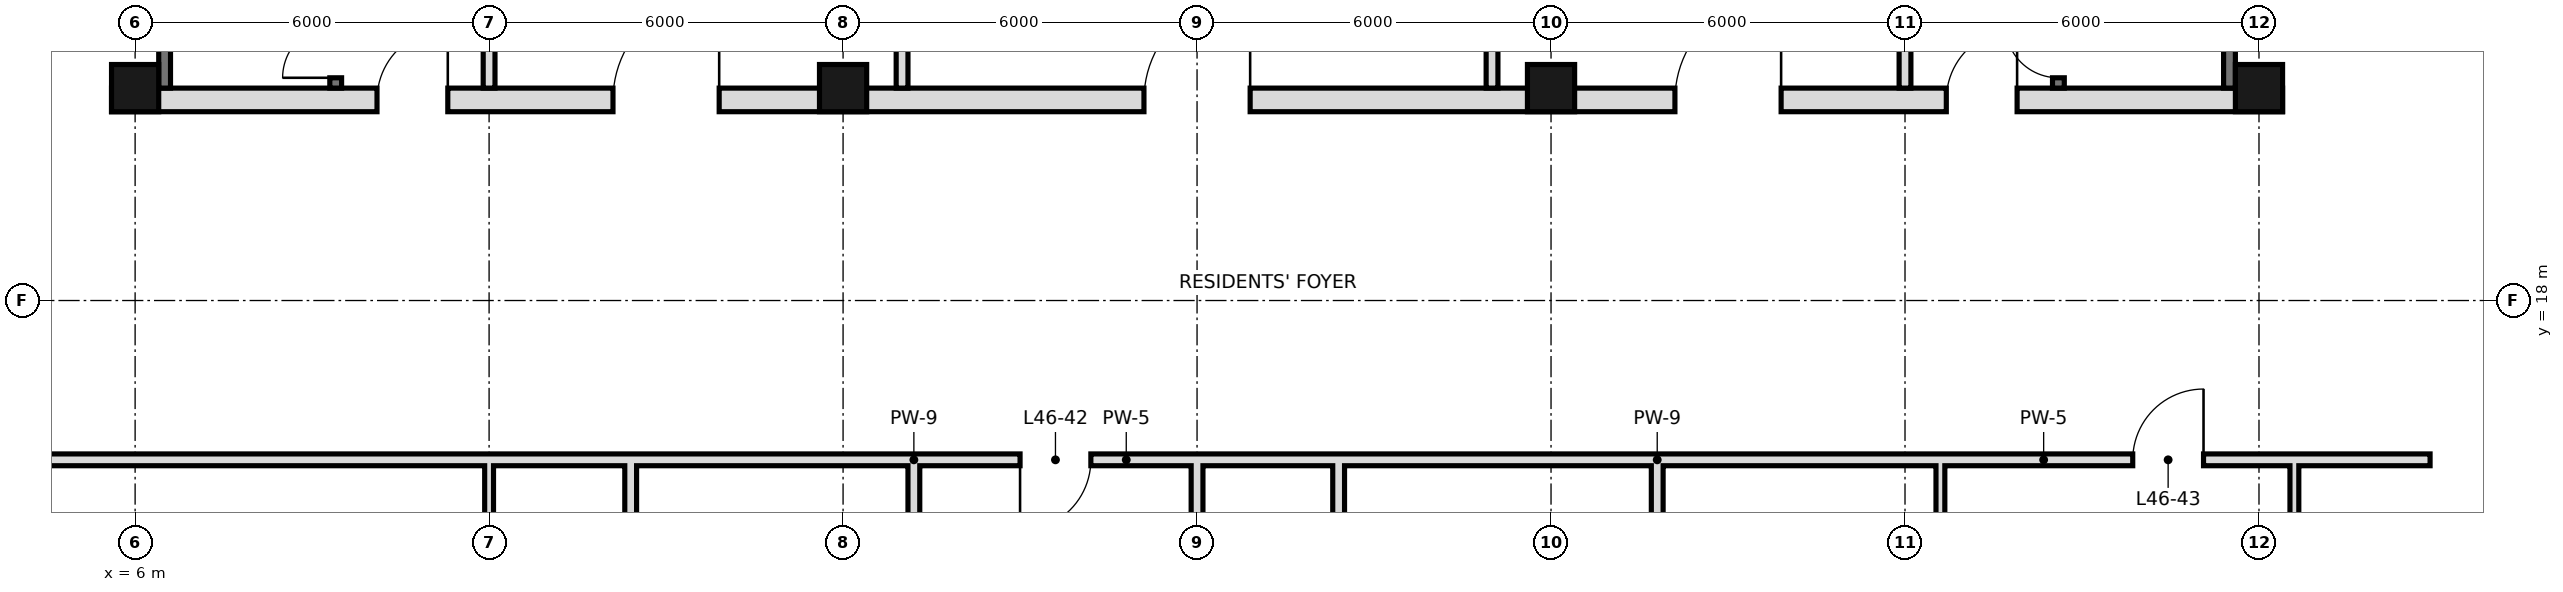
"""IFC4 building model, lengths in metres.
Left out: names, types, materials, properties, quantities, classifications, styles, units other than length and angle.
Written with IfcOpenShell. Run it as: python <this file> out.ifc"""

import sys

from ifc_helpers import new_model, si_unit, direction, frame, frame_2d, origin, origin_2d, place, context, subcontext, project, spatial, rectangle, hollow_rectangle, extrude, element, fill, save


model = new_model("IFC4")
c1 = context("Model", 3, precision=1e-05, world=origin(), true_north=direction((0.0, 1.0)))
c2 = subcontext(c1, "Body", "Model", "MODEL_VIEW")
j1 = project(units=[si_unit("LENGTHUNIT", "METRE"), si_unit("PLANEANGLEUNIT", "RADIAN")], contexts=[c1])
p1 = place(None, origin())
s1 = spatial("IfcSite", under=j1, at=p1, CompositionType="ELEMENT")
p2 = place(p1, origin())
s2 = spatial("IfcBuilding", under=s1, at=p2, CompositionType="ELEMENT")
p3 = place(p2, frame((0.0, 0.0, 199.2)))
s3 = spatial("IfcBuildingStorey", under=s2, at=p3, CompositionType="ELEMENT", Elevation=199.2)
for number, where, z_axis, x_axis in (
    (1, (6.0, 21.6, 0.0), (0.0, 0.0, 1.0), (1.0, 0.0, 0.0)),
    (2, (18.0, 21.6, 0.0), (0.0, 0.0, 1.0), (1.0, 0.0, 0.0)),
    (3, (30.0, 21.6, 0.0), (0.0, 0.0, 1.0), (1.0, 0.0, 0.0)),
    (4, (42.0, 21.6, 0.0), (0.0, 0.0, 1.0), (1.0, 0.0, 0.0)),
):
    element("IfcColumn", number, at=place(p3, frame(where, z_axis=z_axis, x_axis=x_axis)), inside=s3, PredefinedType="COLUMN", context=c2, shape_type="SweptSolid", body=[
        extrude(hollow_rectangle(XDim=0.8, YDim=0.8, WallThickness=0.04, at=origin_2d()), origin(), (0.0, 0.0, 1.0), 3.6),
    ])
p4 = place(p3, frame((12.0, 10.8, 0.0), z_axis=(0.0, 0.0, 1.0), x_axis=(0.0, 1.0, 0.0)))
e5 = element("IfcWall", 5, at=p4, inside=s3, PredefinedType="PARTITIONING", context=c2, shape_type="SweptSolid", body=[
    extrude(rectangle(XDim=4.5, YDim=0.15, at=frame_2d((2.25, 0.0))), origin(), (0.0, 0.0, 1.0), 2.72),
])
for number, where, z_axis, x_axis in (
    (6, (14.4, 10.8, 0.0), (0.0, 0.0, 1.0), (0.0, 1.0, 0.0)),
    (7, (19.2, 10.8, 0.0), (0.0, 0.0, 1.0), (0.0, 1.0, 0.0)),
):
    element("IfcWall", number, at=place(p3, frame(where, z_axis=z_axis, x_axis=x_axis)), inside=s3, PredefinedType="SOLIDWALL", context=c2, shape_type="SweptSolid", body=[
        extrude(rectangle(XDim=4.5, YDim=0.2, at=frame_2d((2.25, 0.0))), origin(), (0.0, 0.0, 1.0), 2.72),
    ])
p5 = place(p3, frame((24.0, 0.0, 0.0), z_axis=(0.0, 0.0, 1.0), x_axis=(0.0, 1.0, 0.0)))
e8 = element("IfcWall", 8, at=p5, inside=s3, PredefinedType="SOLIDWALL", context=c2, shape_type="SweptSolid", body=[
    extrude(rectangle(XDim=15.3, YDim=0.2, at=frame_2d((7.65, 0.0))), origin(), (0.0, 0.0, 1.0), 2.72),
])
p6 = place(p3, frame((26.4, 10.8, 0.0), z_axis=(0.0, 0.0, 1.0), x_axis=(0.0, 1.0, 0.0)))
e9 = element("IfcWall", 9, at=p6, inside=s3, PredefinedType="SOLIDWALL", context=c2, shape_type="SweptSolid", body=[
    extrude(rectangle(XDim=4.5, YDim=0.2, at=frame_2d((2.25, 0.0))), origin(), (0.0, 0.0, 1.0), 2.72),
])
p7 = place(p3, frame((31.8, 10.8, 0.0), z_axis=(0.0, 0.0, 1.0), x_axis=(0.0, 1.0, 0.0)))
e10 = element("IfcWall", 10, at=p7, inside=s3, PredefinedType="SOLIDWALL", context=c2, shape_type="SweptSolid", body=[
    extrude(rectangle(XDim=4.5, YDim=0.2, at=frame_2d((2.25, 0.0))), origin(), (0.0, 0.0, 1.0), 3.42),
])
for number, where, z_axis, x_axis in (
    (11, (36.6, 10.8, 0.0), (0.0, 0.0, 1.0), (0.0, 1.0, 0.0)),
    (12, (42.6, 10.8, 0.0), (0.0, 0.0, 1.0), (0.0, 1.0, 0.0)),
):
    element("IfcWall", number, at=place(p3, frame(where, z_axis=z_axis, x_axis=x_axis)), inside=s3, PredefinedType="PARTITIONING", context=c2, shape_type="SweptSolid", body=[
        extrude(rectangle(XDim=4.5, YDim=0.15, at=frame_2d((2.25, 0.0))), origin(), (0.0, 0.0, 1.0), 3.42),
    ])
p8 = place(p3, frame((3.1, 15.3, 0.0), z_axis=(0.0, 0.0, 1.0), x_axis=(1.0, 0.0, 0.0)))
e13 = element("IfcWall", 13, at=p8, inside=s3, PredefinedType="SOLIDWALL", context=c2, shape_type="SweptSolid", body=[
    extrude(rectangle(XDim=11.3, YDim=0.2, at=frame_2d((5.65, 0.0))), origin(), (0.0, 0.0, 1.0), 2.72),
])
p9 = place(p3, frame((19.2, 15.3, 0.0), z_axis=(0.0, 0.0, 1.0), x_axis=(1.0, 0.0, 0.0)))
e14 = element("IfcWall", 14, at=p9, inside=s3, PredefinedType="SOLIDWALL", context=c2, shape_type="SweptSolid", body=[
    extrude(rectangle(XDim=7.2, YDim=0.2, at=frame_2d((3.6, 0.0))), origin(), (0.0, 0.0, 1.0), 3.42),
])
p10 = place(p9, frame((1.8, 0.0, 0.0)))
e15 = element("IfcOpeningElement", 15, at=p10, cuts=e14, PredefinedType="OPENING", context=c2, shape_type="SweptSolid", body=[
    extrude(rectangle(XDim=1.2, YDim=2.4, at=frame_2d((0.6, 1.2))), frame((0.0, 0.11, 0.0), z_axis=(0.0, -1.0, 0.0), x_axis=(1.0, 0.0, 0.0)), (0.0, 0.0, 1.0), 0.22),
])
p11 = place(p3, frame((31.8, 15.3, 0.0), z_axis=(0.0, 0.0, 1.0), x_axis=(1.0, 0.0, 0.0)))
e16 = element("IfcWall", 16, at=p11, inside=s3, PredefinedType="SOLIDWALL", context=c2, shape_type="SweptSolid", body=[
    extrude(rectangle(XDim=13.1, YDim=0.2, at=frame_2d((6.55, 0.0))), origin(), (0.0, 0.0, 1.0), 2.72),
])
p12 = place(p11, frame((8.06, 0.0, 0.0)))
e17 = element("IfcOpeningElement", 17, at=p12, cuts=e16, PredefinedType="OPENING", context=c2, shape_type="SweptSolid", body=[
    extrude(rectangle(XDim=1.2, YDim=2.4, at=frame_2d((0.6, 1.2))), frame((0.0, 0.11, 0.0), z_axis=(0.0, -1.0, 0.0), x_axis=(1.0, 0.0, 0.0)), (0.0, 0.0, 1.0), 0.22),
])
p13 = place(p3, frame((14.4, 15.3, 0.0), z_axis=(0.0, 0.0, 1.0), x_axis=(1.0, 0.0, 0.0)))
e18 = element("IfcWall", 18, at=p13, inside=s3, PredefinedType="SOLIDWALL", context=c2, shape_type="SweptSolid", body=[
    extrude(rectangle(XDim=4.8, YDim=0.2, at=frame_2d((2.4, 0.0))), origin(), (0.0, 0.0, 1.0), 2.72),
])
p14 = place(p3, frame((26.4, 15.3, 0.0), z_axis=(0.0, 0.0, 1.0), x_axis=(1.0, 0.0, 0.0)))
e19 = element("IfcWall", 19, at=p14, inside=s3, PredefinedType="SOLIDWALL", context=c2, shape_type="SweptSolid", body=[
    extrude(rectangle(XDim=5.4, YDim=0.2, at=frame_2d((2.7, 0.0))), origin(), (0.0, 0.0, 1.0), 2.72),
])
for number, where, z_axis, x_axis in (
    (20, (6.5, 21.6, 0.0), (0.0, 0.0, 1.0), (0.0, 1.0, 0.0)),
    (21, (41.5, 21.6, 0.0), (0.0, 0.0, 1.0), (0.0, 1.0, 0.0)),
):
    element("IfcWall", number, at=place(p3, frame(where, z_axis=z_axis, x_axis=x_axis)), inside=s3, PredefinedType="SOLIDWALL", context=c2, shape_type="SweptSolid", body=[
        extrude(rectangle(XDim=23.5, YDim=0.2, at=frame_2d((11.75, 0.0))), origin(), (0.0, 0.0, 1.0), 3.42),
    ])
p15 = place(p3, frame((5.6, 21.4, 0.0), z_axis=(0.0, 0.0, 1.0), x_axis=(1.0, 0.0, 0.0)))
e22 = element("IfcWall", 22, at=p15, inside=s3, PredefinedType="SOLIDWALL", context=c2, shape_type="SweptSolid", body=[
    extrude(rectangle(XDim=36.8, YDim=0.4, at=frame_2d((18.4, 0.0))), origin(), (0.0, 0.0, 1.0), 3.42),
])
p16 = place(p15, frame((8.5, 0.0, 0.0)))
e23 = element("IfcOpeningElement", 23, at=p16, cuts=e22, PredefinedType="OPENING", context=c2, shape_type="SweptSolid", body=[
    extrude(rectangle(XDim=1.8, YDim=2.1, at=frame_2d((0.9, 1.05))), frame((0.0, 0.21, 0.0), z_axis=(0.0, -1.0, 0.0), x_axis=(1.0, 0.0, 0.0)), (0.0, 0.0, 1.0), 0.42),
])
p17 = place(p15, frame((17.5, 0.0, 0.0)))
e24 = element("IfcOpeningElement", 24, at=p17, cuts=e22, PredefinedType="OPENING", context=c2, shape_type="SweptSolid", body=[
    extrude(rectangle(XDim=1.8, YDim=2.1, at=frame_2d((0.9, 1.05))), frame((0.0, 0.21, 0.0), z_axis=(0.0, -1.0, 0.0), x_axis=(1.0, 0.0, 0.0)), (0.0, 0.0, 1.0), 0.42),
])
p18 = place(p15, frame((26.5, 0.0, 0.0)))
e25 = element("IfcOpeningElement", 25, at=p18, cuts=e22, PredefinedType="OPENING", context=c2, shape_type="SweptSolid", body=[
    extrude(rectangle(XDim=1.8, YDim=2.1, at=frame_2d((0.9, 1.05))), frame((0.0, 0.21, 0.0), z_axis=(0.0, -1.0, 0.0), x_axis=(1.0, 0.0, 0.0)), (0.0, 0.0, 1.0), 0.42),
])
p19 = place(p15, frame((4.5, 0.0, 0.0)))
e26 = element("IfcOpeningElement", 26, at=p19, cuts=e22, PredefinedType="OPENING", context=c2, shape_type="SweptSolid", body=[
    extrude(rectangle(XDim=1.2, YDim=2.1, at=frame_2d((0.6, 1.05))), frame((0.0, 0.21, 0.0), z_axis=(0.0, -1.0, 0.0), x_axis=(1.0, 0.0, 0.0)), (0.0, 0.0, 1.0), 0.42),
])
p20 = place(p15, frame((31.1, 0.0, 0.0)))
e27 = element("IfcOpeningElement", 27, at=p20, cuts=e22, PredefinedType="OPENING", context=c2, shape_type="SweptSolid", body=[
    extrude(rectangle(XDim=1.2, YDim=2.1, at=frame_2d((0.6, 1.05))), frame((0.0, 0.21, 0.0), z_axis=(0.0, -1.0, 0.0), x_axis=(1.0, 0.0, 0.0)), (0.0, 0.0, 1.0), 0.42),
])
p21 = place(p3, frame((19.0, 21.6, 0.0), z_axis=(0.0, 0.0, 1.0), x_axis=(0.0, 1.0, 0.0)))
e28 = element("IfcWall", 28, at=p21, inside=s3, PredefinedType="PARTITIONING", context=c2, shape_type="SweptSolid", body=[
    extrude(rectangle(XDim=6.0, YDim=0.2, at=frame_2d((3.0, 0.0))), origin(), (0.0, 0.0, 1.0), 3.42),
])
p22 = place(p21, frame((2.1, 0.0, 0.0)))
e29 = element("IfcOpeningElement", 29, at=p22, cuts=e28, PredefinedType="OPENING", context=c2, shape_type="SweptSolid", body=[
    extrude(rectangle(XDim=1.8, YDim=2.1, at=frame_2d((0.9, 1.05))), frame((0.0, 0.11, 0.0), z_axis=(0.0, -1.0, 0.0), x_axis=(1.0, 0.0, 0.0)), (0.0, 0.0, 1.0), 0.22),
])
p23 = place(p3, frame((29.0, 21.6, 0.0), z_axis=(0.0, 0.0, 1.0), x_axis=(0.0, 1.0, 0.0)))
e30 = element("IfcWall", 30, at=p23, inside=s3, PredefinedType="PARTITIONING", context=c2, shape_type="SweptSolid", body=[
    extrude(rectangle(XDim=6.0, YDim=0.2, at=frame_2d((3.0, 0.0))), origin(), (0.0, 0.0, 1.0), 3.42),
])
p24 = place(p23, frame((2.1, 0.0, 0.0)))
e31 = element("IfcOpeningElement", 31, at=p24, cuts=e30, PredefinedType="OPENING", context=c2, shape_type="SweptSolid", body=[
    extrude(rectangle(XDim=1.8, YDim=2.1, at=frame_2d((0.9, 1.05))), frame((0.0, 0.11, 0.0), z_axis=(0.0, -1.0, 0.0), x_axis=(1.0, 0.0, 0.0)), (0.0, 0.0, 1.0), 0.22),
])
for number, where, z_axis, x_axis in (
    (32, (12.0, 21.6, 0.0), (0.0, 0.0, 1.0), (0.0, 1.0, 0.0)),
    (33, (36.0, 21.6, 0.0), (0.0, 0.0, 1.0), (0.0, 1.0, 0.0)),
):
    element("IfcWall", number, at=place(p3, frame(where, z_axis=z_axis, x_axis=x_axis)), inside=s3, PredefinedType="PARTITIONING", context=c2, shape_type="SweptSolid", body=[
        extrude(rectangle(XDim=6.1, YDim=0.2, at=frame_2d((3.05, 0.0))), origin(), (0.0, 0.0, 1.0), 3.42),
    ])
p25 = place(p3, frame((38.6, 21.6, 0.0), z_axis=(0.0, 0.0, 1.0), x_axis=(0.0, 1.0, 0.0)))
e34 = element("IfcWall", 34, at=p25, inside=s3, PredefinedType="SOLIDWALL", context=c2, shape_type="SweptSolid", body=[
    extrude(rectangle(XDim=23.4, YDim=0.2, at=frame_2d((11.7, 0.0))), origin(), (0.0, 0.0, 1.0), 3.42),
])
p26 = place(p25, frame((7.0, 0.0, 0.0)))
e35 = element("IfcOpeningElement", 35, at=p26, cuts=e34, PredefinedType="OPENING", context=c2, shape_type="SweptSolid", body=[
    extrude(rectangle(XDim=1.1, YDim=2.1, at=frame_2d((0.55, 1.05))), frame((0.0, 0.11, 0.0), z_axis=(0.0, -1.0, 0.0), x_axis=(1.0, 0.0, 0.0)), (0.0, 0.0, 1.0), 0.22),
])
p27 = place(p25, frame((10.1, 0.0, 0.0)))
e36 = element("IfcOpeningElement", 36, at=p27, cuts=e34, PredefinedType="OPENING", context=c2, shape_type="SweptSolid", body=[
    extrude(rectangle(XDim=1.1, YDim=2.1, at=frame_2d((0.55, 1.05))), frame((0.0, 0.11, 0.0), z_axis=(0.0, -1.0, 0.0), x_axis=(1.0, 0.0, 0.0)), (0.0, 0.0, 1.0), 0.22),
])
p28 = place(p25, frame((13.2, 0.0, 0.0)))
e37 = element("IfcOpeningElement", 37, at=p28, cuts=e34, PredefinedType="OPENING", context=c2, shape_type="SweptSolid", body=[
    extrude(rectangle(XDim=1.1, YDim=2.1, at=frame_2d((0.55, 1.05))), frame((0.0, 0.11, 0.0), z_axis=(0.0, -1.0, 0.0), x_axis=(1.0, 0.0, 0.0)), (0.0, 0.0, 1.0), 0.22),
])
p29 = place(p25, frame((22.1, 0.0, 0.0)))
e38 = element("IfcOpeningElement", 38, at=p29, cuts=e34, PredefinedType="OPENING", context=c2, shape_type="SweptSolid", body=[
    extrude(rectangle(XDim=1.0, YDim=2.1, at=frame_2d((0.5, 1.05))), frame((0.0, 0.11, 0.0), z_axis=(0.0, -1.0, 0.0), x_axis=(1.0, 0.0, 0.0)), (0.0, 0.0, 1.0), 0.22),
])
p30 = place(p25, frame((0.175, 0.0, 0.0)))
e39 = element("IfcOpeningElement", 39, at=p30, cuts=e34, PredefinedType="OPENING", context=c2, shape_type="SweptSolid", body=[
    extrude(rectangle(XDim=0.9, YDim=2.1, at=frame_2d((0.45, 1.05))), frame((0.0, 0.11, 0.0), z_axis=(0.0, -1.0, 0.0), x_axis=(1.0, 0.0, 0.0)), (0.0, 0.0, 1.0), 0.22),
])
p31 = place(p3, frame((9.4, 21.6, 0.0), z_axis=(0.0, 0.0, 1.0), x_axis=(0.0, 1.0, 0.0)))
e40 = element("IfcWall", 40, at=p31, inside=s3, PredefinedType="SOLIDWALL", context=c2, shape_type="SweptSolid", body=[
    extrude(rectangle(XDim=23.4, YDim=0.2, at=frame_2d((11.7, 0.0))), origin(), (0.0, 0.0, 1.0), 3.42),
])
p32 = place(p31, frame((7.8, 0.0, 0.0)))
e41 = element("IfcOpeningElement", 41, at=p32, cuts=e40, PredefinedType="OPENING", context=c2, shape_type="SweptSolid", body=[
    extrude(rectangle(XDim=1.0, YDim=2.1, at=frame_2d((0.5, 1.05))), frame((0.0, 0.11, 0.0), z_axis=(0.0, -1.0, 0.0), x_axis=(1.0, 0.0, 0.0)), (0.0, 0.0, 1.0), 0.22),
])
p33 = place(p31, frame((12.45, 0.0, 0.0)))
e42 = element("IfcOpeningElement", 42, at=p33, cuts=e40, PredefinedType="OPENING", context=c2, shape_type="SweptSolid", body=[
    extrude(rectangle(XDim=1.0, YDim=2.1, at=frame_2d((0.5, 1.05))), frame((0.0, 0.11, 0.0), z_axis=(0.0, -1.0, 0.0), x_axis=(1.0, 0.0, 0.0)), (0.0, 0.0, 1.0), 0.22),
])
p34 = place(p31, frame((22.1, 0.0, 0.0)))
e43 = element("IfcOpeningElement", 43, at=p34, cuts=e40, PredefinedType="OPENING", context=c2, shape_type="SweptSolid", body=[
    extrude(rectangle(XDim=1.0, YDim=2.1, at=frame_2d((0.5, 1.05))), frame((0.0, 0.11, 0.0), z_axis=(0.0, -1.0, 0.0), x_axis=(1.0, 0.0, 0.0)), (0.0, 0.0, 1.0), 0.22),
])
p35 = place(p31, frame((0.175, 0.0, 0.0)))
e44 = element("IfcOpeningElement", 44, at=p35, cuts=e40, PredefinedType="OPENING", context=c2, shape_type="SweptSolid", body=[
    extrude(rectangle(XDim=0.9, YDim=2.1, at=frame_2d((0.45, 1.05))), frame((0.0, 0.11, 0.0), z_axis=(0.0, -1.0, 0.0), x_axis=(1.0, 0.0, 0.0)), (0.0, 0.0, 1.0), 0.22),
])
p36 = place(p10, frame((1.2, 0.0, 0.0), z_axis=(0.0, 0.0, 1.0), x_axis=(-1.0, 0.0, 0.0)))
e45 = element("IfcDoor", 45, at=p36, inside=s3, OperationType="SINGLE_SWING_RIGHT", PredefinedType="DOOR", context=c2, shape_type="SweptSolid", body=[
    extrude(rectangle(XDim=1.2, YDim=2.4, at=frame_2d((0.6, 1.2))), frame((0.0, 0.025, 0.0), z_axis=(0.0, -1.0, 0.0), x_axis=(1.0, 0.0, 0.0)), (0.0, 0.0, 1.0), 0.05),
])
fill(e15, e45)
p37 = place(p12, frame((1.2, 0.0, 0.0), z_axis=(0.0, 0.0, 1.0), x_axis=(-1.0, 0.0, 0.0)))
e46 = element("IfcDoor", 46, at=p37, inside=s3, OperationType="SINGLE_SWING_LEFT", PredefinedType="DOOR", context=c2, shape_type="SweptSolid", body=[
    extrude(rectangle(XDim=1.2, YDim=2.4, at=frame_2d((0.6, 1.2))), frame((0.0, 0.025, 0.0), z_axis=(0.0, -1.0, 0.0), x_axis=(1.0, 0.0, 0.0)), (0.0, 0.0, 1.0), 0.05),
])
fill(e17, e46)
p38 = place(p16, frame((1.8, 0.0, 0.0), z_axis=(0.0, 0.0, 1.0), x_axis=(-1.0, 0.0, 0.0)))
e47 = element("IfcDoor", 47, at=p38, inside=s3, OperationType="SINGLE_SWING_LEFT", PredefinedType="DOOR", context=c2, shape_type="SweptSolid", body=[
    extrude(rectangle(XDim=1.8, YDim=2.1, at=frame_2d((0.9, 1.05))), frame((0.0, 0.025, 0.0), z_axis=(0.0, -1.0, 0.0), x_axis=(1.0, 0.0, 0.0)), (0.0, 0.0, 1.0), 0.05),
])
fill(e23, e47)
p39 = place(p17, frame((1.8, 0.0, 0.0), z_axis=(0.0, 0.0, 1.0), x_axis=(-1.0, 0.0, 0.0)))
e48 = element("IfcDoor", 48, at=p39, inside=s3, OperationType="SINGLE_SWING_LEFT", PredefinedType="DOOR", context=c2, shape_type="SweptSolid", body=[
    extrude(rectangle(XDim=1.8, YDim=2.1, at=frame_2d((0.9, 1.05))), frame((0.0, 0.025, 0.0), z_axis=(0.0, -1.0, 0.0), x_axis=(1.0, 0.0, 0.0)), (0.0, 0.0, 1.0), 0.05),
])
fill(e24, e48)
p40 = place(p18, frame((1.8, 0.0, 0.0), z_axis=(0.0, 0.0, 1.0), x_axis=(-1.0, 0.0, 0.0)))
e49 = element("IfcDoor", 49, at=p40, inside=s3, OperationType="SINGLE_SWING_LEFT", PredefinedType="DOOR", context=c2, shape_type="SweptSolid", body=[
    extrude(rectangle(XDim=1.8, YDim=2.1, at=frame_2d((0.9, 1.05))), frame((0.0, 0.025, 0.0), z_axis=(0.0, -1.0, 0.0), x_axis=(1.0, 0.0, 0.0)), (0.0, 0.0, 1.0), 0.05),
])
fill(e25, e49)
p41 = place(p19, frame((1.2, 0.0, 0.0), z_axis=(0.0, 0.0, 1.0), x_axis=(-1.0, 0.0, 0.0)))
e50 = element("IfcDoor", 50, at=p41, inside=s3, OperationType="SINGLE_SWING_LEFT", PredefinedType="DOOR", context=c2, shape_type="SweptSolid", body=[
    extrude(rectangle(XDim=1.2, YDim=2.1, at=frame_2d((0.6, 1.05))), frame((0.0, 0.025, 0.0), z_axis=(0.0, -1.0, 0.0), x_axis=(1.0, 0.0, 0.0)), (0.0, 0.0, 1.0), 0.05),
])
fill(e26, e50)
p42 = place(p20, frame((1.2, 0.0, 0.0), z_axis=(0.0, 0.0, 1.0), x_axis=(-1.0, 0.0, 0.0)))
e51 = element("IfcDoor", 51, at=p42, inside=s3, OperationType="SINGLE_SWING_LEFT", PredefinedType="DOOR", context=c2, shape_type="SweptSolid", body=[
    extrude(rectangle(XDim=1.2, YDim=2.1, at=frame_2d((0.6, 1.05))), frame((0.0, 0.025, 0.0), z_axis=(0.0, -1.0, 0.0), x_axis=(1.0, 0.0, 0.0)), (0.0, 0.0, 1.0), 0.05),
])
fill(e27, e51)
p43 = place(p35, origin())
e52 = element("IfcDoor", 52, at=p43, inside=s3, OperationType="SINGLE_SWING_LEFT", PredefinedType="DOOR", context=c2, shape_type="SweptSolid", body=[
    extrude(rectangle(XDim=0.9, YDim=2.1, at=frame_2d((0.45, 1.05))), frame((0.0, 0.025, 0.0), z_axis=(0.0, -1.0, 0.0), x_axis=(1.0, 0.0, 0.0)), (0.0, 0.0, 1.0), 0.05),
])
fill(e44, e52)
p44 = place(p30, frame((0.9, 0.0, 0.0), z_axis=(0.0, 0.0, 1.0), x_axis=(-1.0, 0.0, 0.0)))
e53 = element("IfcDoor", 53, at=p44, inside=s3, OperationType="SINGLE_SWING_LEFT", PredefinedType="DOOR", context=c2, shape_type="SweptSolid", body=[
    extrude(rectangle(XDim=0.9, YDim=2.1, at=frame_2d((0.45, 1.05))), frame((0.0, 0.025, 0.0), z_axis=(0.0, -1.0, 0.0), x_axis=(1.0, 0.0, 0.0)), (0.0, 0.0, 1.0), 0.05),
])
fill(e39, e53)
save(model, sys.argv[1])
